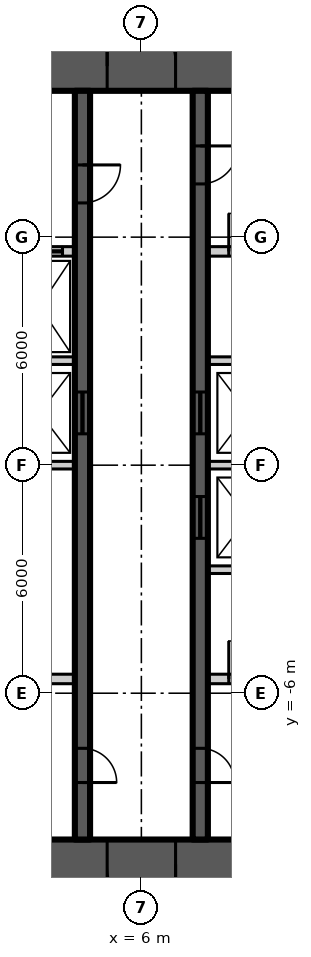
"""IFC4 building model, lengths in metres.
Left out: names, types, materials, properties, quantities, classifications, styles, units other than length and angle.
Written with IfcOpenShell. Run it as: python <this file> out.ifc"""

import sys

from ifc_helpers import new_model, si_unit, direction, frame, frame_2d, origin, place, context, subcontext, project, spatial, rectangle, extrude, element, fill, save


model = new_model("IFC4")
c1 = context("Model", 3, precision=1e-05, world=origin(), true_north=direction((0.0, 1.0)))
c2 = subcontext(c1, "Body", "Model", "MODEL_VIEW")
j1 = project(units=[si_unit("LENGTHUNIT", "METRE"), si_unit("PLANEANGLEUNIT", "RADIAN")], contexts=[c1])
p1 = place(None, origin())
s1 = spatial("IfcSite", under=j1, at=p1, CompositionType="ELEMENT")
p2 = place(p1, origin())
s2 = spatial("IfcBuilding", under=s1, at=p2, CompositionType="ELEMENT")
p3 = place(p2, frame((0.0, 0.0, 286.8)))
s3 = spatial("IfcBuildingStorey", under=s2, at=p3, CompositionType="ELEMENT", Elevation=286.8)
p4 = place(p3, frame((-11.15, 10.5, 0.0), z_axis=(0.0, 0.0, 1.0), x_axis=(1.0, 0.0, 0.0)))
e1 = element("IfcWall", 1, at=p4, inside=s3, PredefinedType="SHEAR", context=c2, shape_type="SweptSolid", body=[
    extrude(rectangle(XDim=22.3, YDim=1.3, at=frame_2d((11.15, 0.0))), origin(), (0.0, 0.0, 1.0), 3.9),
])
p5 = place(p4, frame((4.25, 0.0, 0.0)))
e2 = element("IfcOpeningElement", 2, at=p5, cuts=e1, PredefinedType="OPENING", context=c2, shape_type="SweptSolid", body=[
    extrude(rectangle(XDim=1.8, YDim=2.2, at=frame_2d((0.9, 1.1))), frame((0.0, 0.66, 0.0), z_axis=(0.0, -1.0, 0.0), x_axis=(1.0, 0.0, 0.0)), (0.0, 0.0, 1.0), 1.32),
])
p6 = place(p4, frame((16.25, 0.0, 0.0)))
e3 = element("IfcOpeningElement", 3, at=p6, cuts=e1, PredefinedType="OPENING", context=c2, shape_type="SweptSolid", body=[
    extrude(rectangle(XDim=1.8, YDim=2.2, at=frame_2d((0.9, 1.1))), frame((0.0, 0.66, 0.0), z_axis=(0.0, -1.0, 0.0), x_axis=(1.0, 0.0, 0.0)), (0.0, 0.0, 1.0), 1.32),
])
p7 = place(p3, frame((11.15, -10.5, 0.0), z_axis=(0.0, 0.0, 1.0), x_axis=(-1.0, 0.0, 0.0)))
e4 = element("IfcWall", 4, at=p7, inside=s3, PredefinedType="SHEAR", context=c2, shape_type="SweptSolid", body=[
    extrude(rectangle(XDim=22.3, YDim=1.3, at=frame_2d((11.15, 0.0))), origin(), (0.0, 0.0, 1.0), 3.9),
])
p8 = place(p7, frame((16.25, 0.0, 0.0)))
e5 = element("IfcOpeningElement", 5, at=p8, cuts=e4, PredefinedType="OPENING", context=c2, shape_type="SweptSolid", body=[
    extrude(rectangle(XDim=1.8, YDim=2.2, at=frame_2d((0.9, 1.1))), frame((0.0, 0.66, 0.0), z_axis=(0.0, -1.0, 0.0), x_axis=(1.0, 0.0, 0.0)), (0.0, 0.0, 1.0), 1.32),
])
p9 = place(p7, frame((4.25, 0.0, 0.0)))
e6 = element("IfcOpeningElement", 6, at=p9, cuts=e4, PredefinedType="OPENING", context=c2, shape_type="SweptSolid", body=[
    extrude(rectangle(XDim=1.8, YDim=2.2, at=frame_2d((0.9, 1.1))), frame((0.0, 0.66, 0.0), z_axis=(0.0, -1.0, 0.0), x_axis=(1.0, 0.0, 0.0)), (0.0, 0.0, 1.0), 1.32),
])
p10 = place(p3, frame((7.55, 9.85, 0.0), z_axis=(0.0, 0.0, 1.0), x_axis=(0.0, -1.0, 0.0)))
e7 = element("IfcWall", 7, at=p10, inside=s3, PredefinedType="SHEAR", context=c2, shape_type="SweptSolid", body=[
    extrude(rectangle(XDim=19.7, YDim=0.4, at=frame_2d((9.85, 0.0))), origin(), (0.0, 0.0, 1.0), 3.9),
])
p11 = place(p10, frame((1.45, 0.0, 0.0)))
e8 = element("IfcOpeningElement", 8, at=p11, cuts=e7, PredefinedType="OPENING", context=c2, shape_type="SweptSolid", body=[
    extrude(rectangle(XDim=1.0, YDim=2.2, at=frame_2d((0.5, 1.1))), frame((0.0, 0.21, 0.0), z_axis=(0.0, -1.0, 0.0), x_axis=(1.0, 0.0, 0.0)), (0.0, 0.0, 1.0), 0.42),
])
p12 = place(p10, frame((17.3, 0.0, 0.0)))
e9 = element("IfcOpeningElement", 9, at=p12, cuts=e7, PredefinedType="OPENING", context=c2, shape_type="SweptSolid", body=[
    extrude(rectangle(XDim=0.9, YDim=2.1, at=frame_2d((0.45, 1.05))), frame((0.0, 0.21, 0.0), z_axis=(0.0, -1.0, 0.0), x_axis=(1.0, 0.0, 0.0)), (0.0, 0.0, 1.0), 0.42),
])
p13 = place(p10, frame((7.925, 0.0, 0.0)))
e10 = element("IfcOpeningElement", 10, at=p13, cuts=e7, PredefinedType="OPENING", context=c2, shape_type="SweptSolid", body=[
    extrude(rectangle(XDim=1.1, YDim=2.2, at=frame_2d((0.55, 1.1))), frame((0.0, 0.21, 0.0), z_axis=(0.0, -1.0, 0.0), x_axis=(1.0, 0.0, 0.0)), (0.0, 0.0, 1.0), 0.42),
])
p14 = place(p10, frame((10.675, 0.0, 0.0)))
e11 = element("IfcOpeningElement", 11, at=p14, cuts=e7, PredefinedType="OPENING", context=c2, shape_type="SweptSolid", body=[
    extrude(rectangle(XDim=1.1, YDim=2.2, at=frame_2d((0.55, 1.1))), frame((0.0, 0.21, 0.0), z_axis=(0.0, -1.0, 0.0), x_axis=(1.0, 0.0, 0.0)), (0.0, 0.0, 1.0), 0.42),
])
p15 = place(p3, frame((4.45, 9.85, 0.0), z_axis=(0.0, 0.0, 1.0), x_axis=(0.0, -1.0, 0.0)))
e12 = element("IfcWall", 12, at=p15, inside=s3, PredefinedType="SHEAR", context=c2, shape_type="SweptSolid", body=[
    extrude(rectangle(XDim=19.7, YDim=0.4, at=frame_2d((9.85, 0.0))), origin(), (0.0, 0.0, 1.0), 3.9),
])
p16 = place(p15, frame((1.95, 0.0, 0.0)))
e13 = element("IfcOpeningElement", 13, at=p16, cuts=e12, PredefinedType="OPENING", context=c2, shape_type="SweptSolid", body=[
    extrude(rectangle(XDim=1.0, YDim=2.2, at=frame_2d((0.5, 1.1))), frame((0.0, 0.21, 0.0), z_axis=(0.0, -1.0, 0.0), x_axis=(1.0, 0.0, 0.0)), (0.0, 0.0, 1.0), 0.42),
])
p17 = place(p15, frame((17.3, 0.0, 0.0)))
e14 = element("IfcOpeningElement", 14, at=p17, cuts=e12, PredefinedType="OPENING", context=c2, shape_type="SweptSolid", body=[
    extrude(rectangle(XDim=0.9, YDim=2.1, at=frame_2d((0.45, 1.05))), frame((0.0, 0.21, 0.0), z_axis=(0.0, -1.0, 0.0), x_axis=(1.0, 0.0, 0.0)), (0.0, 0.0, 1.0), 0.42),
])
p18 = place(p15, frame((7.925, 0.0, 0.0)))
e15 = element("IfcOpeningElement", 15, at=p18, cuts=e12, PredefinedType="OPENING", context=c2, shape_type="SweptSolid", body=[
    extrude(rectangle(XDim=1.1, YDim=2.2, at=frame_2d((0.55, 1.1))), frame((0.0, 0.21, 0.0), z_axis=(0.0, -1.0, 0.0), x_axis=(1.0, 0.0, 0.0)), (0.0, 0.0, 1.0), 0.42),
])
p19 = place(p3, frame((2.4, 5.625, 0.0), z_axis=(0.0, 0.0, 1.0), x_axis=(1.0, 0.0, 0.0)))
e16 = element("IfcWall", 16, at=p19, inside=s3, PredefinedType="SOLIDWALL", context=c2, shape_type="SweptSolid", body=[
    extrude(rectangle(XDim=1.85, YDim=0.25, at=frame_2d((0.925, 0.0))), origin(), (0.0, 0.0, 1.0), 3.7),
])
p20 = place(p19, frame((0.325, 0.0, 0.0)))
e17 = element("IfcOpeningElement", 17, at=p20, cuts=e16, PredefinedType="OPENING", context=c2, shape_type="SweptSolid", body=[
    extrude(rectangle(XDim=1.2, YDim=2.2, at=frame_2d((0.6, 1.1))), frame((0.0, 0.135, 0.0), z_axis=(0.0, -1.0, 0.0), x_axis=(1.0, 0.0, 0.0)), (0.0, 0.0, 1.0), 0.27),
])
p21 = place(p3, frame((7.75, 5.625, 0.0), z_axis=(0.0, 0.0, 1.0), x_axis=(1.0, 0.0, 0.0)))
e18 = element("IfcWall", 18, at=p21, inside=s3, PredefinedType="SOLIDWALL", context=c2, shape_type="SweptSolid", body=[
    extrude(rectangle(XDim=2.1, YDim=0.25, at=frame_2d((1.05, 0.0))), origin(), (0.0, 0.0, 1.0), 3.7),
])
p22 = place(p21, frame((0.55, 0.0, 0.0)))
e19 = element("IfcOpeningElement", 19, at=p22, cuts=e18, PredefinedType="OPENING", context=c2, shape_type="SweptSolid", body=[
    extrude(rectangle(XDim=1.0, YDim=2.2, at=frame_2d((0.5, 1.1))), frame((0.0, 0.135, 0.0), z_axis=(0.0, -1.0, 0.0), x_axis=(1.0, 0.0, 0.0)), (0.0, 0.0, 1.0), 0.27),
])
p23 = place(p3, frame((2.4, -5.625, 0.0), z_axis=(0.0, 0.0, 1.0), x_axis=(1.0, 0.0, 0.0)))
e20 = element("IfcWall", 20, at=p23, inside=s3, PredefinedType="SOLIDWALL", context=c2, shape_type="SweptSolid", body=[
    extrude(rectangle(XDim=1.85, YDim=0.25, at=frame_2d((0.925, 0.0))), origin(), (0.0, 0.0, 1.0), 3.7),
])
p24 = place(p3, frame((7.75, -5.625, 0.0), z_axis=(0.0, 0.0, 1.0), x_axis=(1.0, 0.0, 0.0)))
e21 = element("IfcWall", 21, at=p24, inside=s3, PredefinedType="SOLIDWALL", context=c2, shape_type="SweptSolid", body=[
    extrude(rectangle(XDim=2.1, YDim=0.25, at=frame_2d((1.05, 0.0))), origin(), (0.0, 0.0, 1.0), 3.7),
])
p25 = place(p24, frame((0.55, 0.0, 0.0)))
e22 = element("IfcOpeningElement", 22, at=p25, cuts=e21, PredefinedType="OPENING", context=c2, shape_type="SweptSolid", body=[
    extrude(rectangle(XDim=1.0, YDim=2.2, at=frame_2d((0.5, 1.1))), frame((0.0, 0.135, 0.0), z_axis=(0.0, -1.0, 0.0), x_axis=(1.0, 0.0, 0.0)), (0.0, 0.0, 1.0), 0.27),
])
p26 = place(p3, frame((7.75, -2.75, 0.0), z_axis=(0.0, 0.0, 1.0), x_axis=(1.0, 0.0, 0.0)))
e23 = element("IfcWall", 23, at=p26, inside=s3, PredefinedType="SOLIDWALL", context=c2, shape_type="SweptSolid", body=[
    extrude(rectangle(XDim=2.1, YDim=0.2, at=frame_2d((1.05, 0.0))), origin(), (0.0, 0.0, 1.0), 3.7),
])
p27 = place(p3, frame((2.4, 0.0, 0.0), z_axis=(0.0, 0.0, 1.0), x_axis=(1.0, 0.0, 0.0)))
e24 = element("IfcWall", 24, at=p27, inside=s3, PredefinedType="SOLIDWALL", context=c2, shape_type="SweptSolid", body=[
    extrude(rectangle(XDim=1.85, YDim=0.2, at=frame_2d((0.925, 0.0))), origin(), (0.0, 0.0, 1.0), 3.7),
])
p28 = place(p3, frame((7.75, 0.0, 0.0), z_axis=(0.0, 0.0, 1.0), x_axis=(1.0, 0.0, 0.0)))
e25 = element("IfcWall", 25, at=p28, inside=s3, PredefinedType="SOLIDWALL", context=c2, shape_type="SweptSolid", body=[
    extrude(rectangle(XDim=2.1, YDim=0.2, at=frame_2d((1.05, 0.0))), origin(), (0.0, 0.0, 1.0), 3.7),
])
p29 = place(p3, frame((2.4, 2.75, 0.0), z_axis=(0.0, 0.0, 1.0), x_axis=(1.0, 0.0, 0.0)))
e26 = element("IfcWall", 26, at=p29, inside=s3, PredefinedType="SOLIDWALL", context=c2, shape_type="SweptSolid", body=[
    extrude(rectangle(XDim=1.85, YDim=0.2, at=frame_2d((0.925, 0.0))), origin(), (0.0, 0.0, 1.0), 3.7),
])
p30 = place(p3, frame((7.75, 2.75, 0.0), z_axis=(0.0, 0.0, 1.0), x_axis=(1.0, 0.0, 0.0)))
e27 = element("IfcWall", 27, at=p30, inside=s3, PredefinedType="SOLIDWALL", context=c2, shape_type="SweptSolid", body=[
    extrude(rectangle(XDim=2.1, YDim=0.2, at=frame_2d((1.05, 0.0))), origin(), (0.0, 0.0, 1.0), 3.7),
])
p31 = place(p6, origin())
e28 = element("IfcDoor", 28, at=p31, inside=s3, OperationType="DOUBLE_DOOR_DOUBLE_SWING", PredefinedType="DOOR", context=c2, shape_type="SweptSolid", body=[
    extrude(rectangle(XDim=1.8, YDim=2.2, at=frame_2d((0.9, 1.1))), frame((0.0, 0.025, 0.0), z_axis=(0.0, -1.0, 0.0), x_axis=(1.0, 0.0, 0.0)), (0.0, 0.0, 1.0), 0.05),
])
fill(e3, e28)
p32 = place(p9, origin())
e29 = element("IfcDoor", 29, at=p32, inside=s3, OperationType="DOUBLE_DOOR_DOUBLE_SWING", PredefinedType="DOOR", context=c2, shape_type="SweptSolid", body=[
    extrude(rectangle(XDim=1.8, YDim=2.2, at=frame_2d((0.9, 1.1))), frame((0.0, 0.025, 0.0), z_axis=(0.0, -1.0, 0.0), x_axis=(1.0, 0.0, 0.0)), (0.0, 0.0, 1.0), 0.05),
])
fill(e6, e29)
p33 = place(p11, origin())
e30 = element("IfcDoor", 30, at=p33, inside=s3, OperationType="SINGLE_SWING_LEFT", PredefinedType="DOOR", context=c2, shape_type="SweptSolid", body=[
    extrude(rectangle(XDim=1.0, YDim=2.2, at=frame_2d((0.5, 1.1))), frame((0.0, 0.025, 0.0), z_axis=(0.0, -1.0, 0.0), x_axis=(1.0, 0.0, 0.0)), (0.0, 0.0, 1.0), 0.05),
])
fill(e8, e30)
p34 = place(p16, origin())
e31 = element("IfcDoor", 31, at=p34, inside=s3, OperationType="SINGLE_SWING_LEFT", PredefinedType="DOOR", context=c2, shape_type="SweptSolid", body=[
    extrude(rectangle(XDim=1.0, YDim=2.2, at=frame_2d((0.5, 1.1))), frame((0.0, 0.025, 0.0), z_axis=(0.0, -1.0, 0.0), x_axis=(1.0, 0.0, 0.0)), (0.0, 0.0, 1.0), 0.05),
])
fill(e13, e31)
p35 = place(p12, origin())
e32 = element("IfcDoor", 32, at=p35, inside=s3, OperationType="SINGLE_SWING_RIGHT", PredefinedType="DOOR", context=c2, shape_type="SweptSolid", body=[
    extrude(rectangle(XDim=0.9, YDim=2.1, at=frame_2d((0.45, 1.05))), frame((0.0, 0.025, 0.0), z_axis=(0.0, -1.0, 0.0), x_axis=(1.0, 0.0, 0.0)), (0.0, 0.0, 1.0), 0.05),
])
fill(e9, e32)
p36 = place(p17, origin())
e33 = element("IfcDoor", 33, at=p36, inside=s3, OperationType="SINGLE_SWING_RIGHT", PredefinedType="DOOR", context=c2, shape_type="SweptSolid", body=[
    extrude(rectangle(XDim=0.9, YDim=2.1, at=frame_2d((0.45, 1.05))), frame((0.0, 0.025, 0.0), z_axis=(0.0, -1.0, 0.0), x_axis=(1.0, 0.0, 0.0)), (0.0, 0.0, 1.0), 0.05),
])
fill(e14, e33)
p37 = place(p13, origin())
e34 = element("IfcDoor", 34, at=p37, inside=s3, OperationType="SLIDING_TO_LEFT", PredefinedType="DOOR", context=c2, shape_type="SweptSolid", body=[
    extrude(rectangle(XDim=1.1, YDim=2.2, at=frame_2d((0.55, 1.1))), frame((0.0, 0.025, 0.0), z_axis=(0.0, -1.0, 0.0), x_axis=(1.0, 0.0, 0.0)), (0.0, 0.0, 1.0), 0.05),
])
fill(e10, e34)
p38 = place(p14, origin())
e35 = element("IfcDoor", 35, at=p38, inside=s3, OperationType="SLIDING_TO_LEFT", PredefinedType="DOOR", context=c2, shape_type="SweptSolid", body=[
    extrude(rectangle(XDim=1.1, YDim=2.2, at=frame_2d((0.55, 1.1))), frame((0.0, 0.025, 0.0), z_axis=(0.0, -1.0, 0.0), x_axis=(1.0, 0.0, 0.0)), (0.0, 0.0, 1.0), 0.05),
])
fill(e11, e35)
p39 = place(p18, origin())
e36 = element("IfcDoor", 36, at=p39, inside=s3, OperationType="SLIDING_TO_LEFT", PredefinedType="DOOR", context=c2, shape_type="SweptSolid", body=[
    extrude(rectangle(XDim=1.1, YDim=2.2, at=frame_2d((0.55, 1.1))), frame((0.0, 0.025, 0.0), z_axis=(0.0, -1.0, 0.0), x_axis=(1.0, 0.0, 0.0)), (0.0, 0.0, 1.0), 0.05),
])
fill(e15, e36)
p40 = place(p20, origin())
e37 = element("IfcDoor", 37, at=p40, inside=s3, OperationType="SLIDING_TO_LEFT", PredefinedType="DOOR", context=c2, shape_type="SweptSolid", body=[
    extrude(rectangle(XDim=1.2, YDim=2.2, at=frame_2d((0.6, 1.1))), frame((0.0, 0.025, 0.0), z_axis=(0.0, -1.0, 0.0), x_axis=(1.0, 0.0, 0.0)), (0.0, 0.0, 1.0), 0.05),
])
fill(e17, e37)
p41 = place(p22, origin())
e38 = element("IfcDoor", 38, at=p41, inside=s3, OperationType="SINGLE_SWING_LEFT", PredefinedType="DOOR", context=c2, shape_type="SweptSolid", body=[
    extrude(rectangle(XDim=1.0, YDim=2.2, at=frame_2d((0.5, 1.1))), frame((0.0, 0.025, 0.0), z_axis=(0.0, -1.0, 0.0), x_axis=(1.0, 0.0, 0.0)), (0.0, 0.0, 1.0), 0.05),
])
fill(e19, e38)
p42 = place(p25, origin())
e39 = element("IfcDoor", 39, at=p42, inside=s3, OperationType="SINGLE_SWING_LEFT", PredefinedType="DOOR", context=c2, shape_type="SweptSolid", body=[
    extrude(rectangle(XDim=1.0, YDim=2.2, at=frame_2d((0.5, 1.1))), frame((0.0, 0.025, 0.0), z_axis=(0.0, -1.0, 0.0), x_axis=(1.0, 0.0, 0.0)), (0.0, 0.0, 1.0), 0.05),
])
fill(e22, e39)
save(model, sys.argv[1])
